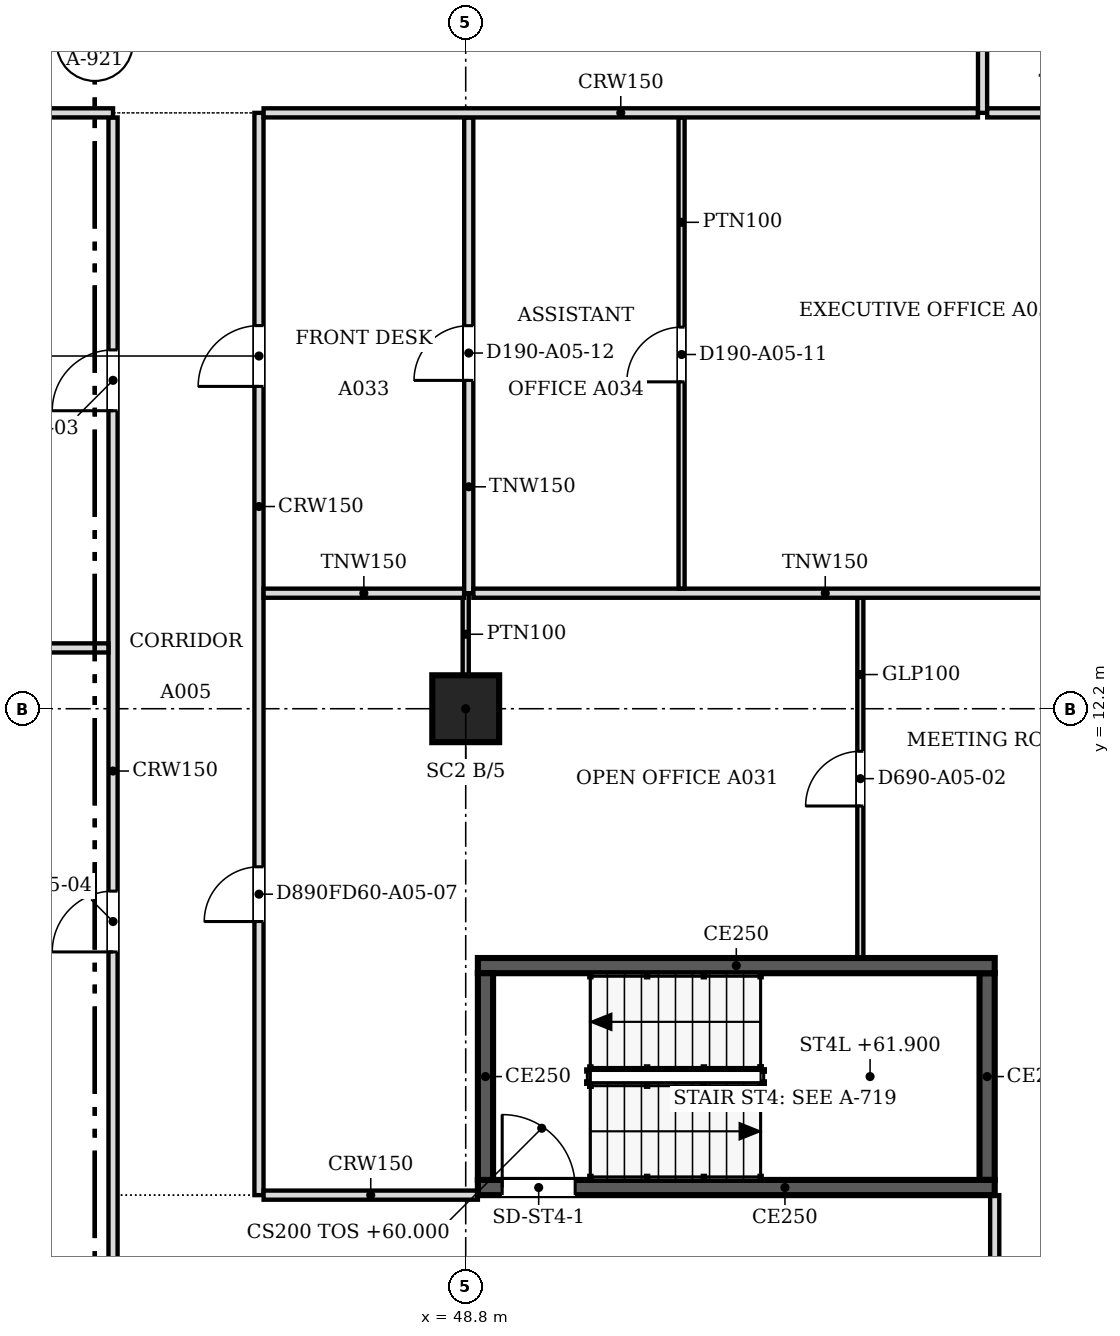
"""IFC4 building model, lengths in metres.
Left out: names, types, materials, properties, quantities, classifications, styles, units other than length and angle.
Written with IfcOpenShell. Run it as: python <this file> out.ifc"""

import sys

from ifc_helpers import new_model, si_unit, direction, frame, frame_2d, origin, origin_2d, place, context, subcontext, project, spatial, polyline, rectangle, outline, extrude, faceted_brep, source, transform, mapped, element, fill, save


model = new_model("IFC4")
c1 = context("Model", 3, precision=1e-05, world=origin(), true_north=direction((0.0, 1.0)))
c2 = subcontext(c1, "Body", "Model", "MODEL_VIEW")
j1 = project(units=[si_unit("LENGTHUNIT", "METRE"), si_unit("PLANEANGLEUNIT", "RADIAN")], contexts=[c1])
p1 = place(None, origin())
s1 = spatial("IfcSite", under=j1, at=p1, CompositionType="ELEMENT")
p2 = place(p1, origin())
s2 = spatial("IfcBuilding", under=s1, at=p2, CompositionType="ELEMENT")
p3 = place(p2, frame((0.0, 0.0, 60.0)))
s3 = spatial("IfcBuildingStorey", under=s2, at=p3, CompositionType="ELEMENT", Elevation=60.0)
p4 = place(p3, frame((48.8, 12.2, 0.0), z_axis=(0.0, 0.0, 1.0), x_axis=(1.0, 0.0, 0.0)))
e1 = element("IfcColumn", 1, at=p4, inside=s3, PredefinedType="COLUMN", context=c2, shape_type="SweptSolid", body=[
    extrude(rectangle(XDim=1.1, YDim=1.1, at=origin_2d()), origin(), (0.0, 0.0, 1.0), 3.5),
])
m1 = source(origin(), c2, "Body", "Brep", [
    faceted_brep([(0.053, -0.25, 0.0), (2.997, -0.25, 3.8), (0.053, -0.25, 7.6), (0.0, -0.25, 7.532), (0.0, -0.25, 0.068), (0.106, 0.25, 7.532), (2.944, 0.25, 3.868), (2.944, 0.25, 3.732), (0.106, 0.25, 0.068), (2.997, 0.0, 3.8), (0.053, 0.0, 0.0), (0.053, 0.0, 7.6)], [[[0, 1, 2, 3, 4]], [[5, 6, 7, 8]], [[8, 7, 9, 1, 0, 10]], [[6, 5, 11, 2, 1, 9]], [[3, 2, 11]], [[10, 0, 4]], [[8, 10, 4, 3, 11, 5]], [[9, 7, 6]]]),
])
p5 = place(p3, frame((57.569, 1.274, -3.8), z_axis=(0.0, 0.0, 1.0), x_axis=(0.707066050402, 0.707147509625, 0.0)))
e2 = element("IfcWall", 2, at=p5, inside=s3, PredefinedType="SOLIDWALL", context=c2, shape_type="MappedRepresentation", body=[
    mapped(m1, transform((0.0, 0.0, 0.0), scale=1.0)),
])
m2 = source(origin(), c2, "Body", "SweptSolid", [
    extrude(outline(polyline([(0.253, 0.666), (2.681, 3.8), (0.253, 6.934), (0.253, 0.666)])), frame((0.0, 0.26, 0.0), z_axis=(0.0, -1.0, 0.0), x_axis=(1.0, 0.0, 0.0)), (0.0, 0.0, 1.0), 0.52),
])
p6 = place(p5, origin())
e3 = element("IfcOpeningElement", 3, at=p6, cuts=e2, PredefinedType="OPENING", context=c2, shape_type="MappedRepresentation", body=[
    mapped(m2, transform((0.0, 0.0, 0.0), scale=1.0)),
])
m3 = source(origin(), c2, "Body", "Brep", [
    faceted_brep([(2.944, -0.25, 0.0), (2.997, -0.25, 0.068), (2.997, -0.25, 3.8), (0.0, -0.25, 3.8), (0.053, 0.25, 3.8), (2.891, 0.25, 3.8), (2.891, 0.25, 0.068), (0.053, 0.25, 3.732), (2.944, 0.0, 0.0), (0.0, 0.0, 3.8)], [[[0, 1, 2, 3]], [[4, 5, 6, 7]], [[1, 0, 8]], [[5, 4, 9, 3, 2]], [[7, 6, 8, 0, 3, 9]], [[7, 9, 4]], [[1, 8, 6, 5, 2]]]),
])
p7 = place(p3, frame((57.606, 1.312, 0.0), z_axis=(0.0, 0.0, 1.0), x_axis=(0.707147509625, 0.707066050402, 0.0)))
e4 = element("IfcWall", 4, at=p7, inside=s3, PredefinedType="SOLIDWALL", context=c2, shape_type="MappedRepresentation", body=[
    mapped(m3, transform((0.0, 0.0, 0.0), scale=1.0)),
])
m4 = source(origin(), c2, "Body", "SweptSolid", [
    extrude(outline(polyline([(2.744, 3.55), (0.51, 3.55), (2.744, 0.666), (2.744, 3.55)])), frame((0.0, 0.26, 0.0), z_axis=(0.0, -1.0, 0.0), x_axis=(1.0, 0.0, 0.0)), (0.0, 0.0, 1.0), 0.52),
])
p8 = place(p7, origin())
e5 = element("IfcOpeningElement", 5, at=p8, cuts=e4, PredefinedType="OPENING", context=c2, shape_type="MappedRepresentation", body=[
    mapped(m4, transform((0.0, 0.0, 0.0), scale=1.0)),
])
p9 = place(p3, frame((57.5, 4.325, 0.0), z_axis=(0.0, 0.0, 1.0), x_axis=(-1.0, 0.0, 0.0)))
e6 = element("IfcWall", 6, at=p9, inside=s3, PredefinedType="SOLIDWALL", context=c2, shape_type="SweptSolid", body=[
    extrude(rectangle(XDim=8.5, YDim=0.25, at=frame_2d((4.25, 0.0))), origin(), (0.0, 0.0, 1.0), 3.8),
])
m5 = source(origin(), c2, "Body", "SweptSolid", [
    extrude(rectangle(XDim=1.2, YDim=2.1, at=frame_2d((0.6, 1.05))), frame((0.0, 0.135, 0.0), z_axis=(0.0, -1.0, 0.0), x_axis=(1.0, 0.0, 0.0)), (0.0, 0.0, 1.0), 0.27),
])
p10 = place(p9, frame((6.9, 0.0, 0.0)))
e7 = element("IfcOpeningElement", 7, at=p10, cuts=e6, PredefinedType="OPENING", context=c2, shape_type="MappedRepresentation", body=[
    mapped(m5, transform((0.0, 0.0, 0.0), scale=1.0)),
])
p11 = place(p3, frame((49.125, 4.45, 0.0), z_axis=(0.0, 0.0, 1.0), x_axis=(0.0, 1.0, 0.0)))
e8 = element("IfcWall", 8, at=p11, inside=s3, PredefinedType="SOLIDWALL", context=c2, shape_type="SweptSolid", body=[
    extrude(rectangle(XDim=3.4, YDim=0.25, at=frame_2d((1.7, 0.0))), origin(), (0.0, 0.0, 1.0), 3.8),
])
p12 = place(p3, frame((49.0, 7.975, 0.0), z_axis=(0.0, 0.0, 1.0), x_axis=(1.0, 0.0, 0.0)))
e9 = element("IfcWall", 9, at=p12, inside=s3, PredefinedType="SOLIDWALL", context=c2, shape_type="SweptSolid", body=[
    extrude(rectangle(XDim=8.5, YDim=0.25, at=frame_2d((4.25, 0.0))), origin(), (0.0, 0.0, 1.0), 3.8),
])
p13 = place(p3, frame((57.375, 7.85, 0.0), z_axis=(0.0, 0.0, 1.0), x_axis=(0.0, -1.0, 0.0)))
e10 = element("IfcWall", 10, at=p13, inside=s3, PredefinedType="SOLIDWALL", context=c2, shape_type="SweptSolid", body=[
    extrude(rectangle(XDim=3.4, YDim=0.25, at=frame_2d((1.7, 0.0))), origin(), (0.0, 0.0, 1.0), 3.8),
])
p14 = place(p3, frame((43.0, 0.5, 0.0), z_axis=(0.0, 0.0, 1.0), x_axis=(0.0, 1.0, 0.0)))
e11 = element("IfcWall", 11, at=p14, inside=s3, PredefinedType="PARTITIONING", context=c2, shape_type="SweptSolid", body=[
    extrude(rectangle(XDim=21.424, YDim=0.15, at=frame_2d((10.712, 0.0))), origin(), (0.0, 0.0, 1.0), 2.888),
])
m6 = source(origin(), c2, "Body", "SweptSolid", [
    extrude(rectangle(XDim=1.0, YDim=2.1, at=frame_2d((0.5, 1.05))), frame((0.0, 0.085, 0.0), z_axis=(0.0, -1.0, 0.0), x_axis=(1.0, 0.0, 0.0)), (0.0, 0.0, 1.0), 0.17),
])
p15 = place(p14, frame((16.601, 0.0, 0.0)))
e12 = element("IfcOpeningElement", 12, at=p15, cuts=e11, PredefinedType="OPENING", context=c2, shape_type="MappedRepresentation", body=[
    mapped(m6, transform((0.0, 0.0, 0.0), scale=1.0)),
])
p16 = place(p14, frame((7.7, 0.0, 0.0)))
e13 = element("IfcOpeningElement", 13, at=p16, cuts=e11, PredefinedType="OPENING", context=c2, shape_type="MappedRepresentation", body=[
    mapped(m6, transform((0.0, 0.0, 0.0), scale=1.0)),
])
p17 = place(p3, frame((57.5, 1.559, 0.0), z_axis=(0.0, 0.0, 1.0), x_axis=(0.0, 1.0, 0.0)))
e14 = element("IfcWall", 14, at=p17, inside=s3, PredefinedType="PARTITIONING", context=c2, shape_type="SweptSolid", body=[
    extrude(rectangle(XDim=2.641, YDim=0.15, at=frame_2d((1.32, 0.0))), origin(), (0.0, 0.0, 1.0), 2.888),
])
p18 = place(p3, frame((45.4, 22.0, 0.0), z_axis=(0.0, 0.0, 1.0), x_axis=(0.0, -1.0, 0.0)))
e15 = element("IfcWall", 15, at=p18, inside=s3, PredefinedType="PARTITIONING", context=c2, shape_type="SweptSolid", body=[
    extrude(rectangle(XDim=17.8, YDim=0.15, at=frame_2d((8.9, 0.0))), origin(), (0.0, 0.0, 1.0), 2.888),
])
p19 = place(p18, frame((3.499, 0.0, 0.0)))
e16 = element("IfcOpeningElement", 16, at=p19, cuts=e15, PredefinedType="OPENING", context=c2, shape_type="MappedRepresentation", body=[
    mapped(m6, transform((0.0, 0.0, 0.0), scale=1.0)),
])
m7 = source(origin(), c2, "Body", "SweptSolid", [
    extrude(rectangle(XDim=0.9, YDim=2.1, at=frame_2d((0.45, 1.05))), frame((0.0, 0.085, 0.0), z_axis=(0.0, -1.0, 0.0), x_axis=(1.0, 0.0, 0.0)), (0.0, 0.0, 1.0), 0.17),
])
p20 = place(p18, frame((12.4, 0.0, 0.0)))
e17 = element("IfcOpeningElement", 17, at=p20, cuts=e15, PredefinedType="OPENING", context=c2, shape_type="MappedRepresentation", body=[
    mapped(m7, transform((0.0, 0.0, 0.0), scale=1.0)),
])
p21 = place(p3, frame((45.476, 4.2, 0.0), z_axis=(0.0, 0.0, 1.0), x_axis=(1.0, 0.0, 0.0)))
e18 = element("IfcWall", 18, at=p21, inside=s3, PredefinedType="PARTITIONING", context=c2, shape_type="SweptSolid", body=[
    extrude(rectangle(XDim=3.524, YDim=0.15, at=frame_2d((1.762, 0.0))), origin(), (0.0, 0.0, 1.0), 2.888),
])
p22 = place(p3, frame((55.29, 14.024, 0.0), z_axis=(0.0, 0.0, 1.0), x_axis=(0.0, -1.0, 0.0)))
e19 = element("IfcWall", 19, at=p22, inside=s3, PredefinedType="PARTITIONING", context=c2, shape_type="SweptSolid", body=[
    extrude(rectangle(XDim=5.924, YDim=0.1, at=frame_2d((2.962, 0.0))), origin(), (0.0, 0.0, 1.0), 2.888),
])
m8 = source(origin(), c2, "Body", "SweptSolid", [
    extrude(rectangle(XDim=0.9, YDim=2.1, at=frame_2d((0.45, 1.05))), frame((0.0, 0.06, 0.0), z_axis=(0.0, -1.0, 0.0), x_axis=(1.0, 0.0, 0.0)), (0.0, 0.0, 1.0), 0.12),
])
p23 = place(p22, frame((2.524, 0.0, 0.0)))
e20 = element("IfcOpeningElement", 20, at=p23, cuts=e19, PredefinedType="OPENING", context=c2, shape_type="MappedRepresentation", body=[
    mapped(m8, transform((0.0, 0.0, 0.0), scale=1.0)),
])
p24 = place(p3, frame((48.8, 12.75, 0.0), z_axis=(0.0, 0.0, 1.0), x_axis=(0.0, 1.0, 0.0)))
e21 = element("IfcWall", 21, at=p24, inside=s3, PredefinedType="PARTITIONING", context=c2, shape_type="SweptSolid", body=[
    extrude(rectangle(XDim=1.35, YDim=0.1, at=frame_2d((0.675, 0.0))), origin(), (0.0, 0.0, 1.0), 2.888),
])
p25 = place(p3, frame((24.55, 13.2, 0.0), z_axis=(0.0, 0.0, 1.0), x_axis=(1.0, 0.0, 0.0)))
e22 = element("IfcWall", 22, at=p25, inside=s3, PredefinedType="PARTITIONING", context=c2, shape_type="SweptSolid", body=[
    extrude(rectangle(XDim=18.374, YDim=0.15, at=frame_2d((9.187, 0.0))), origin(), (0.0, 0.0, 1.0), 2.888),
])
p26 = place(p3, frame((45.476, 14.1, 0.0), z_axis=(0.0, 0.0, 1.0), x_axis=(1.0, 0.0, 0.0)))
e23 = element("IfcWall", 23, at=p26, inside=s3, PredefinedType="PARTITIONING", context=c2, shape_type="SweptSolid", body=[
    extrude(rectangle(XDim=3.298, YDim=0.15, at=frame_2d((1.649, 0.0))), origin(), (0.0, 0.0, 1.0), 2.888),
])
p27 = place(p3, frame((48.85, 21.924, 0.0), z_axis=(0.0, 0.0, 1.0), x_axis=(0.0, -1.0, 0.0)))
e24 = element("IfcWall", 24, at=p27, inside=s3, PredefinedType="PARTITIONING", context=c2, shape_type="SweptSolid", body=[
    extrude(rectangle(XDim=7.824, YDim=0.15, at=frame_2d((3.912, 0.0))), origin(), (0.0, 0.0, 1.0), 2.888),
])
p28 = place(p27, frame((3.424, 0.0, 0.0)))
e25 = element("IfcOpeningElement", 25, at=p28, cuts=e24, PredefinedType="OPENING", context=c2, shape_type="MappedRepresentation", body=[
    mapped(m7, transform((0.0, 0.0, 0.0), scale=1.0)),
])
p29 = place(p3, frame((48.926, 14.1, 0.0), z_axis=(0.0, 0.0, 1.0), x_axis=(1.0, 0.0, 0.0)))
e26 = element("IfcWall", 26, at=p29, inside=s3, PredefinedType="PARTITIONING", context=c2, shape_type="SweptSolid", body=[
    extrude(rectangle(XDim=11.574, YDim=0.15, at=frame_2d((5.787, 0.0))), origin(), (0.0, 0.0, 1.0), 2.888),
])
p30 = place(p3, frame((52.35, 21.924, 0.0), z_axis=(0.0, 0.0, 1.0), x_axis=(0.0, -1.0, 0.0)))
e27 = element("IfcWall", 27, at=p30, inside=s3, PredefinedType="PARTITIONING", context=c2, shape_type="SweptSolid", body=[
    extrude(rectangle(XDim=7.748, YDim=0.1, at=frame_2d((3.874, 0.0))), origin(), (0.0, 0.0, 1.0), 2.888),
])
p31 = place(p30, frame((3.448, 0.0, 0.0)))
e28 = element("IfcOpeningElement", 28, at=p31, cuts=e27, PredefinedType="OPENING", context=c2, shape_type="MappedRepresentation", body=[
    mapped(m8, transform((0.0, 0.0, 0.0), scale=1.0)),
])
p32 = place(p3, frame((30.5, 22.0, 0.0), z_axis=(0.0, 0.0, 1.0), x_axis=(1.0, 0.0, 0.0)))
e29 = element("IfcWall", 29, at=p32, inside=s3, PredefinedType="PARTITIONING", context=c2, shape_type="SweptSolid", body=[
    extrude(rectangle(XDim=12.5, YDim=0.15, at=frame_2d((6.25, 0.0))), origin(), (0.0, 0.0, 1.0), 2.888),
])
p33 = place(p3, frame((45.476, 22.0, 0.0), z_axis=(0.0, 0.0, 1.0), x_axis=(1.0, 0.0, 0.0)))
e30 = element("IfcWall", 30, at=p33, inside=s3, PredefinedType="PARTITIONING", context=c2, shape_type="SweptSolid", body=[
    extrude(rectangle(XDim=11.748, YDim=0.15, at=frame_2d((5.874, 0.0))), origin(), (0.0, 0.0, 1.0), 2.888),
])
p34 = place(p3, frame((57.3, 30.6, 0.0), z_axis=(0.0, 0.0, 1.0), x_axis=(0.0, -1.0, 0.0)))
e31 = element("IfcWall", 31, at=p34, inside=s3, PredefinedType="PARTITIONING", context=c2, shape_type="SweptSolid", body=[
    extrude(rectangle(XDim=8.6, YDim=0.15, at=frame_2d((4.3, 0.0))), origin(), (0.0, 0.0, 1.0), 2.888),
])
p35 = place(p34, frame((3.9, 0.0, 0.0)))
e32 = element("IfcOpeningElement", 32, at=p35, cuts=e31, PredefinedType="OPENING", context=c2, shape_type="MappedRepresentation", body=[
    mapped(m7, transform((0.0, 0.0, 0.0), scale=1.0)),
])
p36 = place(p3, frame((57.376, 22.0, 0.0), z_axis=(0.0, 0.0, 1.0), x_axis=(1.0, 0.0, 0.0)))
e33 = element("IfcWall", 33, at=p36, inside=s3, PredefinedType="PARTITIONING", context=c2, shape_type="SweptSolid", body=[
    extrude(rectangle(XDim=3.124, YDim=0.15, at=frame_2d((1.562, 0.0))), origin(), (0.0, 0.0, 1.0), 2.888),
])
m9 = source(origin(), c2, "Body", "SweptSolid", [
    extrude(rectangle(XDim=1.2, YDim=2.1, at=frame_2d((0.6, 1.05))), frame((0.0, 0.025, 0.0), z_axis=(0.0, -1.0, 0.0), x_axis=(1.0, 0.0, 0.0)), (0.0, 0.0, 1.0), 0.05),
])
p37 = place(p10, origin())
e34 = element("IfcDoor", 34, at=p37, inside=s3, OperationType="SINGLE_SWING_RIGHT", PredefinedType="DOOR", context=c2, shape_type="MappedRepresentation", body=[
    mapped(m9, transform((0.0, 0.0, 0.0), scale=1.0)),
])
fill(e7, e34)
m10 = source(origin(), c2, "Body", "SweptSolid", [
    extrude(rectangle(XDim=0.9, YDim=2.1, at=frame_2d((0.45, 1.05))), frame((0.0, 0.025, 0.0), z_axis=(0.0, -1.0, 0.0), x_axis=(1.0, 0.0, 0.0)), (0.0, 0.0, 1.0), 0.05),
])
p38 = place(p23, origin())
e35 = element("IfcDoor", 35, at=p38, inside=s3, OperationType="SINGLE_SWING_RIGHT", PredefinedType="DOOR", context=c2, shape_type="MappedRepresentation", body=[
    mapped(m10, transform((0.0, 0.0, 0.0), scale=1.0)),
])
fill(e20, e35)
p39 = place(p31, origin())
e36 = element("IfcDoor", 36, at=p39, inside=s3, OperationType="SINGLE_SWING_RIGHT", PredefinedType="DOOR", context=c2, shape_type="MappedRepresentation", body=[
    mapped(m10, transform((0.0, 0.0, 0.0), scale=1.0)),
])
fill(e28, e36)
p40 = place(p28, origin())
e37 = element("IfcDoor", 37, at=p40, inside=s3, OperationType="SINGLE_SWING_RIGHT", PredefinedType="DOOR", context=c2, shape_type="MappedRepresentation", body=[
    mapped(m10, transform((0.0, 0.0, 0.0), scale=1.0)),
])
fill(e25, e37)
m11 = source(origin(), c2, "Body", "SweptSolid", [
    extrude(rectangle(XDim=1.0, YDim=2.1, at=frame_2d((0.5, 1.05))), frame((0.0, 0.025, 0.0), z_axis=(0.0, -1.0, 0.0), x_axis=(1.0, 0.0, 0.0)), (0.0, 0.0, 1.0), 0.05),
])
p41 = place(p19, origin())
e38 = element("IfcDoor", 38, at=p41, inside=s3, OperationType="SINGLE_SWING_RIGHT", PredefinedType="DOOR", context=c2, shape_type="MappedRepresentation", body=[
    mapped(m11, transform((0.0, 0.0, 0.0), scale=1.0)),
])
fill(e16, e38)
p42 = place(p15, origin())
e39 = element("IfcDoor", 39, at=p42, inside=s3, OperationType="SINGLE_SWING_LEFT", PredefinedType="DOOR", context=c2, shape_type="MappedRepresentation", body=[
    mapped(m11, transform((0.0, 0.0, 0.0), scale=1.0)),
])
fill(e12, e39)
p43 = place(p16, origin())
e40 = element("IfcDoor", 40, at=p43, inside=s3, OperationType="SINGLE_SWING_LEFT", PredefinedType="DOOR", context=c2, shape_type="MappedRepresentation", body=[
    mapped(m11, transform((0.0, 0.0, 0.0), scale=1.0)),
])
fill(e13, e40)
p44 = place(p20, origin())
e41 = element("IfcDoor", 41, at=p44, inside=s3, OperationType="SINGLE_SWING_RIGHT", PredefinedType="DOOR", context=c2, shape_type="MappedRepresentation", body=[
    mapped(m10, transform((0.0, 0.0, 0.0), scale=1.0)),
])
fill(e17, e41)
save(model, sys.argv[1])
